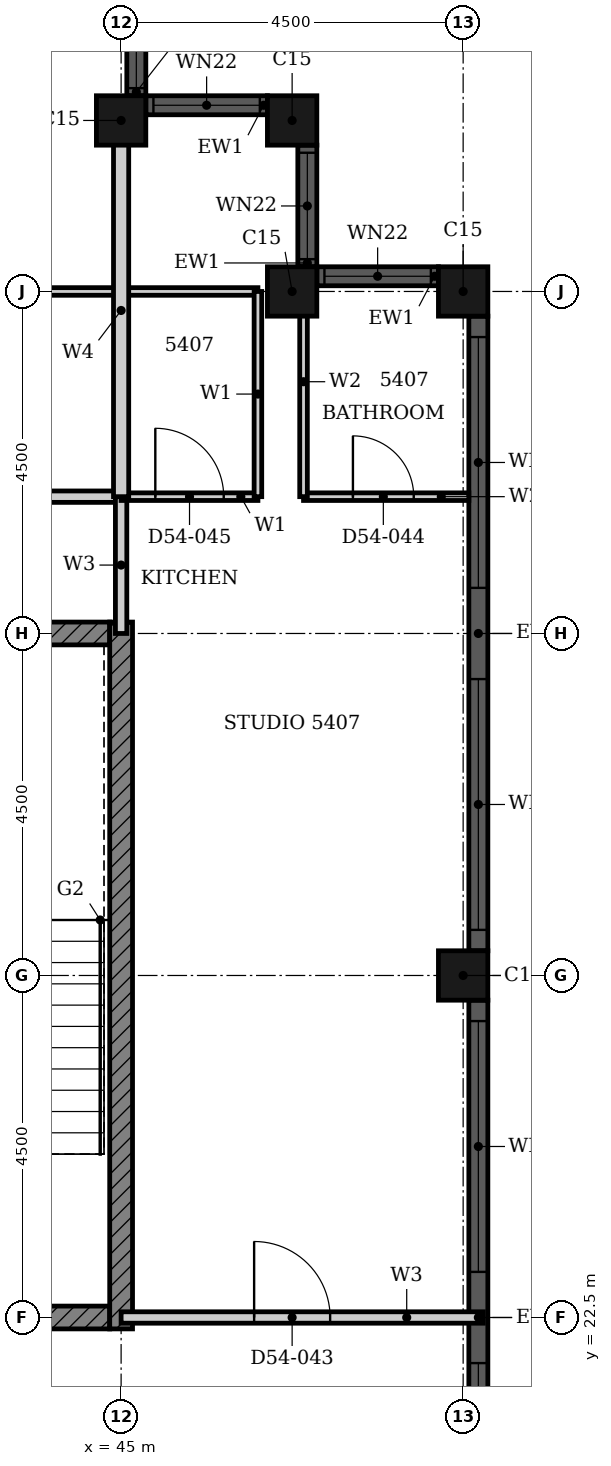
"""IFC4 building model, lengths in metres.
Left out: names, types, materials, properties, quantities, classifications, styles, units other than length and angle.
Written with IfcOpenShell. Run it as: python <this file> out.ifc"""

import sys

from ifc_helpers import new_model, si_unit, direction, frame, frame_2d, origin, origin_2d, place, context, subcontext, project, spatial, rectangle, hollow_rectangle, extrude, element, fill, save


model = new_model("IFC4")
c1 = context("Model", 3, precision=1e-05, world=origin(), true_north=direction((0.0, 1.0)))
c2 = subcontext(c1, "Body", "Model", "MODEL_VIEW")
j1 = project(units=[si_unit("LENGTHUNIT", "METRE"), si_unit("PLANEANGLEUNIT", "RADIAN")], contexts=[c1])
p1 = place(None, origin())
s1 = spatial("IfcSite", under=j1, at=p1, CompositionType="ELEMENT")
p2 = place(p1, origin())
s2 = spatial("IfcBuilding", under=s1, at=p2, CompositionType="ELEMENT")
p3 = place(p2, frame((0.0, 0.0, 214.6)))
s3 = spatial("IfcBuildingStorey", under=s2, at=p3, CompositionType="ELEMENT", Elevation=214.6)
for number, where, z_axis, x_axis in (
    (1, (49.5, 27.0, 0.0), (0.0, 0.0, 1.0), (1.0, 0.0, 0.0)),
    (2, (49.5, 36.0, 0.0), (0.0, 0.0, 1.0), (1.0, 0.0, 0.0)),
    (3, (47.25, 36.0, 0.0), (0.0, 0.0, 1.0), (1.0, 0.0, 0.0)),
    (4, (47.25, 38.25, 0.0), (0.0, 0.0, 1.0), (1.0, 0.0, 0.0)),
    (5, (45.0, 38.25, 0.0), (0.0, 0.0, 1.0), (1.0, 0.0, 0.0)),
):
    element("IfcColumn", number, at=place(p3, frame(where, z_axis=z_axis, x_axis=x_axis)), inside=s3, PredefinedType="COLUMN", context=c2, shape_type="SweptSolid", body=[
        extrude(hollow_rectangle(XDim=0.65, YDim=0.65, WallThickness=0.021, at=origin_2d()), origin(), (0.0, 0.0, 1.0), 3.7),
    ])
p4 = place(p3, frame((49.7, 18.325, 0.0), z_axis=(0.0, 0.0, 1.0), x_axis=(0.0, 1.0, 0.0)))
e6 = element("IfcWall", 6, at=p4, inside=s3, PredefinedType="SOLIDWALL", context=c2, shape_type="SweptSolid", body=[
    extrude(rectangle(XDim=8.35, YDim=0.25, at=frame_2d((4.175, 0.0))), origin(), (0.0, 0.0, 1.0), 3.7),
])
p5 = place(p4, frame((0.275, 0.0, 0.45)))
e7 = element("IfcOpeningElement", 7, at=p5, cuts=e6, PredefinedType="OPENING", context=c2, shape_type="SweptSolid", body=[
    extrude(rectangle(XDim=3.3, YDim=2.3, at=frame_2d((1.65, 1.15))), frame((0.0, 0.135, 0.0), z_axis=(0.0, -1.0, 0.0), x_axis=(1.0, 0.0, 0.0)), (0.0, 0.0, 1.0), 0.27),
])
p6 = place(p4, frame((4.775, 0.0, 0.45)))
e8 = element("IfcOpeningElement", 8, at=p6, cuts=e6, PredefinedType="OPENING", context=c2, shape_type="SweptSolid", body=[
    extrude(rectangle(XDim=3.3, YDim=2.3, at=frame_2d((1.65, 1.15))), frame((0.0, 0.135, 0.0), z_axis=(0.0, -1.0, 0.0), x_axis=(1.0, 0.0, 0.0)), (0.0, 0.0, 1.0), 0.27),
])
p7 = place(p3, frame((49.7, 27.325, 0.0), z_axis=(0.0, 0.0, 1.0), x_axis=(0.0, 1.0, 0.0)))
e9 = element("IfcWall", 9, at=p7, inside=s3, PredefinedType="SOLIDWALL", context=c2, shape_type="SweptSolid", body=[
    extrude(rectangle(XDim=8.35, YDim=0.25, at=frame_2d((4.175, 0.0))), origin(), (0.0, 0.0, 1.0), 3.7),
])
p8 = place(p7, frame((0.275, 0.0, 0.45)))
e10 = element("IfcOpeningElement", 10, at=p8, cuts=e9, PredefinedType="OPENING", context=c2, shape_type="SweptSolid", body=[
    extrude(rectangle(XDim=3.3, YDim=2.3, at=frame_2d((1.65, 1.15))), frame((0.0, 0.135, 0.0), z_axis=(0.0, -1.0, 0.0), x_axis=(1.0, 0.0, 0.0)), (0.0, 0.0, 1.0), 0.27),
])
p9 = place(p7, frame((4.775, 0.0, 0.45)))
e11 = element("IfcOpeningElement", 11, at=p9, cuts=e9, PredefinedType="OPENING", context=c2, shape_type="SweptSolid", body=[
    extrude(rectangle(XDim=3.3, YDim=2.3, at=frame_2d((1.65, 1.15))), frame((0.0, 0.135, 0.0), z_axis=(0.0, -1.0, 0.0), x_axis=(1.0, 0.0, 0.0)), (0.0, 0.0, 1.0), 0.27),
])
p10 = place(p3, frame((49.175, 36.2, 0.0), z_axis=(0.0, 0.0, 1.0), x_axis=(-1.0, 0.0, 0.0)))
e12 = element("IfcWall", 12, at=p10, inside=s3, PredefinedType="SOLIDWALL", context=c2, shape_type="SweptSolid", body=[
    extrude(rectangle(XDim=1.6, YDim=0.25, at=frame_2d((0.8, 0.0))), origin(), (0.0, 0.0, 1.0), 3.7),
])
p11 = place(p10, frame((0.1, 0.0, 0.9)))
e13 = element("IfcOpeningElement", 13, at=p11, cuts=e12, PredefinedType="OPENING", context=c2, shape_type="SweptSolid", body=[
    extrude(rectangle(XDim=1.4, YDim=1.85, at=frame_2d((0.7, 0.925))), frame((0.0, 0.135, 0.0), z_axis=(0.0, -1.0, 0.0), x_axis=(1.0, 0.0, 0.0)), (0.0, 0.0, 1.0), 0.27),
])
p12 = place(p3, frame((47.45, 36.325, 0.0), z_axis=(0.0, 0.0, 1.0), x_axis=(0.0, 1.0, 0.0)))
e14 = element("IfcWall", 14, at=p12, inside=s3, PredefinedType="SOLIDWALL", context=c2, shape_type="SweptSolid", body=[
    extrude(rectangle(XDim=1.6, YDim=0.25, at=frame_2d((0.8, 0.0))), origin(), (0.0, 0.0, 1.0), 3.7),
])
p13 = place(p12, frame((0.1, 0.0, 0.9)))
e15 = element("IfcOpeningElement", 15, at=p13, cuts=e14, PredefinedType="OPENING", context=c2, shape_type="SweptSolid", body=[
    extrude(rectangle(XDim=1.4, YDim=1.85, at=frame_2d((0.7, 0.925))), frame((0.0, 0.135, 0.0), z_axis=(0.0, -1.0, 0.0), x_axis=(1.0, 0.0, 0.0)), (0.0, 0.0, 1.0), 0.27),
])
p14 = place(p3, frame((46.925, 38.45, 0.0), z_axis=(0.0, 0.0, 1.0), x_axis=(-1.0, 0.0, 0.0)))
e16 = element("IfcWall", 16, at=p14, inside=s3, PredefinedType="SOLIDWALL", context=c2, shape_type="SweptSolid", body=[
    extrude(rectangle(XDim=1.6, YDim=0.25, at=frame_2d((0.8, 0.0))), origin(), (0.0, 0.0, 1.0), 3.7),
])
p15 = place(p14, frame((0.1, 0.0, 0.9)))
e17 = element("IfcOpeningElement", 17, at=p15, cuts=e16, PredefinedType="OPENING", context=c2, shape_type="SweptSolid", body=[
    extrude(rectangle(XDim=1.4, YDim=1.85, at=frame_2d((0.7, 0.925))), frame((0.0, 0.135, 0.0), z_axis=(0.0, -1.0, 0.0), x_axis=(1.0, 0.0, 0.0)), (0.0, 0.0, 1.0), 0.27),
])
p16 = place(p3, frame((45.2, 38.575, 0.0), z_axis=(0.0, 0.0, 1.0), x_axis=(0.0, 1.0, 0.0)))
e18 = element("IfcWall", 18, at=p16, inside=s3, PredefinedType="SOLIDWALL", context=c2, shape_type="SweptSolid", body=[
    extrude(rectangle(XDim=1.6, YDim=0.25, at=frame_2d((0.8, 0.0))), origin(), (0.0, 0.0, 1.0), 3.7),
])
p17 = place(p16, frame((0.1, 0.0, 0.9)))
e19 = element("IfcOpeningElement", 19, at=p17, cuts=e18, PredefinedType="OPENING", context=c2, shape_type="SweptSolid", body=[
    extrude(rectangle(XDim=1.4, YDim=1.85, at=frame_2d((0.7, 0.925))), frame((0.0, 0.135, 0.0), z_axis=(0.0, -1.0, 0.0), x_axis=(1.0, 0.0, 0.0)), (0.0, 0.0, 1.0), 0.27),
])
p18 = place(p3, frame((32.911, 22.5, 0.0), z_axis=(0.0, 0.0, 1.0), x_axis=(1.0, 0.0, 0.0)))
e20 = element("IfcWall", 20, at=p18, inside=s3, PredefinedType="SHEAR", context=c2, shape_type="SweptSolid", body=[
    extrude(rectangle(XDim=11.939, YDim=0.3, at=frame_2d((5.97, 0.0))), origin(), (0.0, 0.0, 1.0), 3.4),
])
p19 = place(p18, frame((5.404, 0.0, 0.0)))
e21 = element("IfcOpeningElement", 21, at=p19, cuts=e20, PredefinedType="OPENING", context=c2, shape_type="SweptSolid", body=[
    extrude(rectangle(XDim=1.8, YDim=2.1, at=frame_2d((0.9, 1.05))), frame((0.0, 0.16, 0.0), z_axis=(0.0, -1.0, 0.0), x_axis=(1.0, 0.0, 0.0)), (0.0, 0.0, 1.0), 0.32),
])
p20 = place(p3, frame((40.625, 31.5, 0.0), z_axis=(0.0, 0.0, 1.0), x_axis=(1.0, 0.0, 0.0)))
e22 = element("IfcWall", 22, at=p20, inside=s3, PredefinedType="SHEAR", context=c2, shape_type="SweptSolid", body=[
    extrude(rectangle(XDim=4.225, YDim=0.3, at=frame_2d((2.113, 0.0))), origin(), (0.0, 0.0, 1.0), 3.4),
])
p21 = place(p3, frame((45.0, 22.35, 0.0), z_axis=(0.0, 0.0, 1.0), x_axis=(0.0, 1.0, 0.0)))
e23 = element("IfcWall", 23, at=p21, inside=s3, PredefinedType="SHEAR", context=c2, shape_type="SweptSolid", body=[
    extrude(rectangle(XDim=9.3, YDim=0.3, at=frame_2d((4.65, 0.0))), origin(), (0.0, 0.0, 1.0), 3.4),
])
p22 = place(p3, frame((45.0, 22.5, 0.0), z_axis=(0.0, 0.0, 1.0), x_axis=(1.0, 0.0, 0.0)))
e24 = element("IfcWall", 24, at=p22, inside=s3, PredefinedType="PARTITIONING", context=c2, shape_type="SweptSolid", body=[
    extrude(rectangle(XDim=4.765, YDim=0.15, at=frame_2d((2.382, 0.0))), origin(), (0.0, 0.0, 1.0), 3.4),
])
p23 = place(p22, frame((1.75, 0.0, 0.0)))
e25 = element("IfcOpeningElement", 25, at=p23, cuts=e24, PredefinedType="OPENING", context=c2, shape_type="SweptSolid", body=[
    extrude(rectangle(XDim=1.0, YDim=2.2, at=frame_2d((0.5, 1.1))), frame((0.0, 0.085, 0.0), z_axis=(0.0, -1.0, 0.0), x_axis=(1.0, 0.0, 0.0)), (0.0, 0.0, 1.0), 0.17),
])
p24 = place(p3, frame((33.9, 33.3, 0.0), z_axis=(0.0, 0.0, 1.0), x_axis=(1.0, 0.0, 0.0)))
e26 = element("IfcWall", 26, at=p24, inside=s3, PredefinedType="PARTITIONING", context=c2, shape_type="SweptSolid", body=[
    extrude(rectangle(XDim=11.1, YDim=0.15, at=frame_2d((5.55, 0.0))), origin(), (0.0, 0.0, 1.0), 3.4),
])
p25 = place(p24, frame((1.6, 0.0, 0.0)))
e27 = element("IfcOpeningElement", 27, at=p25, cuts=e26, PredefinedType="OPENING", context=c2, shape_type="SweptSolid", body=[
    extrude(rectangle(XDim=1.0, YDim=2.2, at=frame_2d((0.5, 1.1))), frame((0.0, 0.085, 0.0), z_axis=(0.0, -1.0, 0.0), x_axis=(1.0, 0.0, 0.0)), (0.0, 0.0, 1.0), 0.17),
])
p26 = place(p3, frame((45.0, 31.5, 0.0), z_axis=(0.0, 0.0, 1.0), x_axis=(0.0, 1.0, 0.0)))
e28 = element("IfcWall", 28, at=p26, inside=s3, PredefinedType="PARTITIONING", context=c2, shape_type="SweptSolid", body=[
    extrude(rectangle(XDim=1.8, YDim=0.15, at=frame_2d((0.9, 0.0))), origin(), (0.0, 0.0, 1.0), 3.4),
])
p27 = place(p3, frame((45.0, 33.3, 0.0), z_axis=(0.0, 0.0, 1.0), x_axis=(1.0, 0.0, 0.0)))
e29 = element("IfcWall", 29, at=p27, inside=s3, PredefinedType="PARTITIONING", context=c2, shape_type="SweptSolid", body=[
    extrude(rectangle(XDim=1.8, YDim=0.1, at=frame_2d((0.9, 0.0))), origin(), (0.0, 0.0, 1.0), 3.4),
])
p28 = place(p27, frame((0.45, 0.0, 0.0)))
e30 = element("IfcOpeningElement", 30, at=p28, cuts=e29, PredefinedType="OPENING", context=c2, shape_type="SweptSolid", body=[
    extrude(rectangle(XDim=0.9, YDim=2.1, at=frame_2d((0.45, 1.05))), frame((0.0, 0.06, 0.0), z_axis=(0.0, -1.0, 0.0), x_axis=(1.0, 0.0, 0.0)), (0.0, 0.0, 1.0), 0.12),
])
p29 = place(p3, frame((38.1, 36.0, 0.0), z_axis=(0.0, 0.0, 1.0), x_axis=(1.0, 0.0, 0.0)))
e31 = element("IfcWall", 31, at=p29, inside=s3, PredefinedType="PARTITIONING", context=c2, shape_type="SweptSolid", body=[
    extrude(rectangle(XDim=8.7, YDim=0.1, at=frame_2d((4.35, 0.0))), origin(), (0.0, 0.0, 1.0), 3.4),
])
p30 = place(p29, frame((4.65, 0.0, 0.0)))
e32 = element("IfcOpeningElement", 32, at=p30, cuts=e31, PredefinedType="OPENING", context=c2, shape_type="SweptSolid", body=[
    extrude(rectangle(XDim=0.9, YDim=2.1, at=frame_2d((0.45, 1.05))), frame((0.0, 0.06, 0.0), z_axis=(0.0, -1.0, 0.0), x_axis=(1.0, 0.0, 0.0)), (0.0, 0.0, 1.0), 0.12),
])
p31 = place(p3, frame((46.8, 33.3, 0.0), z_axis=(0.0, 0.0, 1.0), x_axis=(0.0, 1.0, 0.0)))
e33 = element("IfcWall", 33, at=p31, inside=s3, PredefinedType="PARTITIONING", context=c2, shape_type="SweptSolid", body=[
    extrude(rectangle(XDim=2.7, YDim=0.1, at=frame_2d((1.35, 0.0))), origin(), (0.0, 0.0, 1.0), 3.4),
])
p32 = place(p3, frame((45.0, 33.3, 0.0), z_axis=(0.0, 0.0, 1.0), x_axis=(0.0, 1.0, 0.0)))
e34 = element("IfcWall", 34, at=p32, inside=s3, PredefinedType="PARTITIONING", context=c2, shape_type="SweptSolid", body=[
    extrude(rectangle(XDim=4.9, YDim=0.2, at=frame_2d((2.45, 0.0))), origin(), (0.0, 0.0, 1.0), 3.4),
])
p33 = place(p3, frame((47.4, 33.3, 0.0), z_axis=(0.0, 0.0, 1.0), x_axis=(1.0, 0.0, 0.0)))
e35 = element("IfcWall", 35, at=p33, inside=s3, PredefinedType="PARTITIONING", context=c2, shape_type="SweptSolid", body=[
    extrude(rectangle(XDim=2.175, YDim=0.1, at=frame_2d((1.087, 0.0))), origin(), (0.0, 0.0, 1.0), 3.4),
])
p34 = place(p33, frame((0.65, 0.0, 0.0)))
e36 = element("IfcOpeningElement", 36, at=p34, cuts=e35, PredefinedType="OPENING", context=c2, shape_type="SweptSolid", body=[
    extrude(rectangle(XDim=0.8, YDim=2.1, at=frame_2d((0.4, 1.05))), frame((0.0, 0.06, 0.0), z_axis=(0.0, -1.0, 0.0), x_axis=(1.0, 0.0, 0.0)), (0.0, 0.0, 1.0), 0.12),
])
p35 = place(p3, frame((47.4, 33.3, 0.0), z_axis=(0.0, 0.0, 1.0), x_axis=(0.0, 1.0, 0.0)))
e37 = element("IfcWall", 37, at=p35, inside=s3, PredefinedType="PARTITIONING", context=c2, shape_type="SweptSolid", body=[
    extrude(rectangle(XDim=3.025, YDim=0.1, at=frame_2d((1.512, 0.0))), origin(), (0.0, 0.0, 1.0), 3.4),
])
p36 = place(p5, origin())
e38 = element("IfcWindow", 38, at=p36, inside=s3, PartitioningType="SINGLE_PANEL", PredefinedType="WINDOW", context=c2, shape_type="SweptSolid", body=[
    extrude(rectangle(XDim=3.3, YDim=2.3, at=frame_2d((1.65, 1.15))), frame((0.0, 0.03, 0.0), z_axis=(0.0, -1.0, 0.0), x_axis=(1.0, 0.0, 0.0)), (0.0, 0.0, 1.0), 0.06),
])
fill(e7, e38)
p37 = place(p6, origin())
e39 = element("IfcWindow", 39, at=p37, inside=s3, PartitioningType="SINGLE_PANEL", PredefinedType="WINDOW", context=c2, shape_type="SweptSolid", body=[
    extrude(rectangle(XDim=3.3, YDim=2.3, at=frame_2d((1.65, 1.15))), frame((0.0, 0.03, 0.0), z_axis=(0.0, -1.0, 0.0), x_axis=(1.0, 0.0, 0.0)), (0.0, 0.0, 1.0), 0.06),
])
fill(e8, e39)
p38 = place(p8, origin())
e40 = element("IfcWindow", 40, at=p38, inside=s3, PartitioningType="SINGLE_PANEL", PredefinedType="WINDOW", context=c2, shape_type="SweptSolid", body=[
    extrude(rectangle(XDim=3.3, YDim=2.3, at=frame_2d((1.65, 1.15))), frame((0.0, 0.03, 0.0), z_axis=(0.0, -1.0, 0.0), x_axis=(1.0, 0.0, 0.0)), (0.0, 0.0, 1.0), 0.06),
])
fill(e10, e40)
p39 = place(p9, origin())
e41 = element("IfcWindow", 41, at=p39, inside=s3, PartitioningType="SINGLE_PANEL", PredefinedType="WINDOW", context=c2, shape_type="SweptSolid", body=[
    extrude(rectangle(XDim=3.3, YDim=2.3, at=frame_2d((1.65, 1.15))), frame((0.0, 0.03, 0.0), z_axis=(0.0, -1.0, 0.0), x_axis=(1.0, 0.0, 0.0)), (0.0, 0.0, 1.0), 0.06),
])
fill(e11, e41)
p40 = place(p11, origin())
e42 = element("IfcWindow", 42, at=p40, inside=s3, PartitioningType="SINGLE_PANEL", PredefinedType="WINDOW", context=c2, shape_type="SweptSolid", body=[
    extrude(rectangle(XDim=1.4, YDim=1.85, at=frame_2d((0.7, 0.925))), frame((0.0, 0.03, 0.0), z_axis=(0.0, -1.0, 0.0), x_axis=(1.0, 0.0, 0.0)), (0.0, 0.0, 1.0), 0.06),
])
fill(e13, e42)
p41 = place(p13, origin())
e43 = element("IfcWindow", 43, at=p41, inside=s3, PartitioningType="SINGLE_PANEL", PredefinedType="WINDOW", context=c2, shape_type="SweptSolid", body=[
    extrude(rectangle(XDim=1.4, YDim=1.85, at=frame_2d((0.7, 0.925))), frame((0.0, 0.03, 0.0), z_axis=(0.0, -1.0, 0.0), x_axis=(1.0, 0.0, 0.0)), (0.0, 0.0, 1.0), 0.06),
])
fill(e15, e43)
p42 = place(p15, origin())
e44 = element("IfcWindow", 44, at=p42, inside=s3, PartitioningType="SINGLE_PANEL", PredefinedType="WINDOW", context=c2, shape_type="SweptSolid", body=[
    extrude(rectangle(XDim=1.4, YDim=1.85, at=frame_2d((0.7, 0.925))), frame((0.0, 0.03, 0.0), z_axis=(0.0, -1.0, 0.0), x_axis=(1.0, 0.0, 0.0)), (0.0, 0.0, 1.0), 0.06),
])
fill(e17, e44)
p43 = place(p17, origin())
e45 = element("IfcWindow", 45, at=p43, inside=s3, PartitioningType="SINGLE_PANEL", PredefinedType="WINDOW", context=c2, shape_type="SweptSolid", body=[
    extrude(rectangle(XDim=1.4, YDim=1.85, at=frame_2d((0.7, 0.925))), frame((0.0, 0.03, 0.0), z_axis=(0.0, -1.0, 0.0), x_axis=(1.0, 0.0, 0.0)), (0.0, 0.0, 1.0), 0.06),
])
fill(e19, e45)
p44 = place(p23, origin())
e46 = element("IfcDoor", 46, at=p44, inside=s3, OperationType="SINGLE_SWING_RIGHT", PredefinedType="DOOR", context=c2, shape_type="SweptSolid", body=[
    extrude(rectangle(XDim=1.0, YDim=2.2, at=frame_2d((0.5, 1.1))), frame((0.0, 0.025, 0.0), z_axis=(0.0, -1.0, 0.0), x_axis=(1.0, 0.0, 0.0)), (0.0, 0.0, 1.0), 0.05),
])
fill(e25, e46)
p45 = place(p34, origin())
e47 = element("IfcDoor", 47, at=p45, inside=s3, OperationType="SINGLE_SWING_RIGHT", PredefinedType="DOOR", context=c2, shape_type="SweptSolid", body=[
    extrude(rectangle(XDim=0.8, YDim=2.1, at=frame_2d((0.4, 1.05))), frame((0.0, 0.025, 0.0), z_axis=(0.0, -1.0, 0.0), x_axis=(1.0, 0.0, 0.0)), (0.0, 0.0, 1.0), 0.05),
])
fill(e36, e47)
p46 = place(p28, origin())
e48 = element("IfcDoor", 48, at=p46, inside=s3, OperationType="SINGLE_SWING_LEFT", PredefinedType="DOOR", context=c2, shape_type="SweptSolid", body=[
    extrude(rectangle(XDim=0.9, YDim=2.1, at=frame_2d((0.45, 1.05))), frame((0.0, 0.025, 0.0), z_axis=(0.0, -1.0, 0.0), x_axis=(1.0, 0.0, 0.0)), (0.0, 0.0, 1.0), 0.05),
])
fill(e30, e48)
save(model, sys.argv[1])
